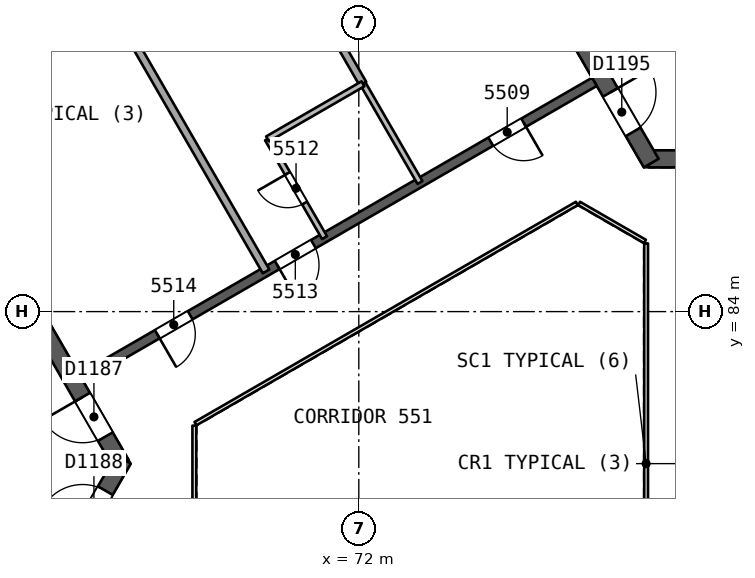
"""IFC4 building model, lengths in metres.
Left out: names, types, materials, properties, quantities, classifications, styles, units other than length and angle.
Written with IfcOpenShell. Run it as: python <this file> out.ifc"""

import sys

from ifc_helpers import new_model, si_unit, direction, frame, frame_2d, origin, place, context, subcontext, project, spatial, rectangle, extrude, element, fill, save


model = new_model("IFC4")
c1 = context("Model", 3, precision=1e-05, world=origin(), true_north=direction((0.0, 1.0)))
c2 = subcontext(c1, "Body", "Model", "MODEL_VIEW")
j1 = project(units=[si_unit("LENGTHUNIT", "METRE"), si_unit("PLANEANGLEUNIT", "RADIAN")], contexts=[c1])
p1 = place(None, origin())
s1 = spatial("IfcSite", under=j1, at=p1, CompositionType="ELEMENT")
p2 = place(p1, origin())
s2 = spatial("IfcBuilding", under=s1, at=p2, CompositionType="ELEMENT")
p3 = place(p2, frame((0.0, 0.0, 224.3)))
s3 = spatial("IfcBuildingStorey", under=s2, at=p3, CompositionType="ELEMENT", Elevation=224.3)
p4 = place(p3, frame((65.74, 80.0, 0.0), z_axis=(0.0, 0.0, 1.0), x_axis=(-0.499991857942, 0.866030104553, 0.0)))
e1 = element("IfcWall", 1, at=p4, inside=s3, PredefinedType="SHEAR", context=c2, shape_type="SweptSolid", body=[
    extrude(rectangle(XDim=10.25, YDim=0.45, at=frame_2d((5.125, 0.0))), origin(), (0.0, 0.0, 1.0), 3.7),
])
p5 = place(p4, frame((0.82, 0.0, 0.0)))
e2 = element("IfcOpeningElement", 2, at=p5, cuts=e1, PredefinedType="OPENING", context=c2, shape_type="SweptSolid", body=[
    extrude(rectangle(XDim=1.2, YDim=2.1, at=frame_2d((0.6, 1.05))), frame((0.0, 0.235, 0.0), z_axis=(0.0, -1.0, 0.0), x_axis=(1.0, 0.0, 0.0)), (0.0, 0.0, 1.0), 0.471),
])
p6 = place(p3, frame((60.728, 71.318, 0.0), z_axis=(0.0, 0.0, 1.0), x_axis=(0.500012416173, 0.866018235185, 0.0)))
e3 = element("IfcWall", 3, at=p6, inside=s3, PredefinedType="SHEAR", context=c2, shape_type="SweptSolid", body=[
    extrude(rectangle(XDim=10.155, YDim=0.45, at=frame_2d((5.078, 0.0))), origin(), (0.0, 0.0, 1.0), 3.7),
])
p7 = place(p6, frame((8.005, 0.0, 0.0)))
e4 = element("IfcOpeningElement", 4, at=p7, cuts=e3, PredefinedType="OPENING", context=c2, shape_type="SweptSolid", body=[
    extrude(rectangle(XDim=1.2, YDim=2.1, at=frame_2d((0.6, 1.05))), frame((0.0, 0.235, 0.0), z_axis=(0.0, -1.0, 0.0), x_axis=(1.0, 0.0, 0.0)), (0.0, 0.0, 1.0), 0.471),
])
p8 = place(p3, frame((79.63, 88.019, 0.0), z_axis=(0.0, 0.0, 1.0), x_axis=(1.0, 0.0, 0.0)))
e5 = element("IfcWall", 5, at=p8, inside=s3, PredefinedType="SHEAR", context=c2, shape_type="SweptSolid", body=[
    extrude(rectangle(XDim=10.25, YDim=0.45, at=frame_2d((5.125, 0.0))), origin(), (0.0, 0.0, 1.0), 3.7),
])
p9 = place(p8, frame((0.82, 0.0, 0.0)))
e6 = element("IfcOpeningElement", 6, at=p9, cuts=e5, PredefinedType="OPENING", context=c2, shape_type="SweptSolid", body=[
    extrude(rectangle(XDim=1.2, YDim=2.1, at=frame_2d((0.6, 1.05))), frame((0.0, 0.235, 0.0), z_axis=(0.0, -1.0, 0.0), x_axis=(1.0, 0.0, 0.0)), (0.0, 0.0, 1.0), 0.471),
])
p10 = place(p3, frame((74.617, 96.701, 0.0), z_axis=(0.0, 0.0, 1.0), x_axis=(0.499994385119, -0.866028645513, 0.0)))
e7 = element("IfcWall", 7, at=p10, inside=s3, PredefinedType="SHEAR", context=c2, shape_type="SweptSolid", body=[
    extrude(rectangle(XDim=10.155, YDim=0.45, at=frame_2d((5.077, 0.0))), origin(), (0.0, 0.0, 1.0), 3.7),
])
p11 = place(p10, frame((8.005, 0.0, 0.0)))
e8 = element("IfcOpeningElement", 8, at=p11, cuts=e7, PredefinedType="OPENING", context=c2, shape_type="SweptSolid", body=[
    extrude(rectangle(XDim=1.2, YDim=2.1, at=frame_2d((0.6, 1.05))), frame((0.0, 0.235, 0.0), z_axis=(0.0, -1.0, 0.0), x_axis=(1.0, 0.0, 0.0)), (0.0, 0.0, 1.0), 0.471),
])
p12 = place(p3, frame((78.2, 90.046, 0.0), z_axis=(0.0, 0.0, 1.0), x_axis=(-0.866026492143, -0.499998114903, 0.0)))
e9 = element("IfcWall", 9, at=p12, inside=s3, PredefinedType="SHEAR", context=c2, shape_type="SweptSolid", body=[
    extrude(rectangle(XDim=15.588, YDim=0.25, at=frame_2d((7.794, 0.0))), origin(), (0.0, 0.0, 1.0), 3.3),
])
p13 = place(p12, frame((2.15, 0.0, 0.0)))
e10 = element("IfcOpeningElement", 10, at=p13, cuts=e9, PredefinedType="OPENING", context=c2, shape_type="SweptSolid", body=[
    extrude(rectangle(XDim=1.0, YDim=2.1, at=frame_2d((0.5, 1.05))), frame((0.0, 0.135, 0.0), z_axis=(0.0, -1.0, 0.0), x_axis=(1.0, 0.0, 0.0)), (0.0, 0.0, 1.0), 0.271),
])
p14 = place(p12, frame((8.538, 0.0, 0.0)))
e11 = element("IfcOpeningElement", 11, at=p14, cuts=e9, PredefinedType="OPENING", context=c2, shape_type="SweptSolid", body=[
    extrude(rectangle(XDim=1.1, YDim=2.1, at=frame_2d((0.55, 1.05))), frame((0.0, 0.135, 0.0), z_axis=(0.0, -1.0, 0.0), x_axis=(1.0, 0.0, 0.0)), (0.0, 0.0, 1.0), 0.271),
])
p15 = place(p12, frame((12.282, 0.0, 0.0)))
e12 = element("IfcOpeningElement", 12, at=p15, cuts=e9, PredefinedType="OPENING", context=c2, shape_type="SweptSolid", body=[
    extrude(rectangle(XDim=1.0, YDim=2.1, at=frame_2d((0.5, 1.05))), frame((0.0, 0.135, 0.0), z_axis=(0.0, -1.0, 0.0), x_axis=(1.0, 0.0, 0.0)), (0.0, 0.0, 1.0), 0.271),
])
p16 = place(p3, frame((68.446, 96.34, 0.0), z_axis=(0.0, 0.0, 1.0), x_axis=(0.500019482754, -0.866014155119, 0.0)))
e13 = element("IfcWall", 13, at=p16, inside=s3, PredefinedType="PARTITIONING", context=c2, shape_type="SweptSolid", body=[
    extrude(rectangle(XDim=7.328, YDim=0.2, at=frame_2d((3.664, 0.0))), origin(), (0.0, 0.0, 1.0), 3.3),
])
p17 = place(p3, frame((72.11, 89.994, 0.0), z_axis=(0.0, 0.0, 1.0), x_axis=(0.499990139034, -0.866031096941, 0.0)))
e14 = element("IfcWall", 14, at=p17, inside=s3, PredefinedType="PARTITIONING", context=c2, shape_type="SweptSolid", body=[
    extrude(rectangle(XDim=3.0, YDim=0.15, at=frame_2d((1.5, 0.0))), origin(), (0.0, 0.0, 1.0), 3.3),
])
p18 = place(p3, frame((71.099, 85.946, 0.0), z_axis=(0.0, 0.0, 1.0), x_axis=(-0.499990139034, 0.866031096941, 0.0)))
e15 = element("IfcWall", 15, at=p18, inside=s3, PredefinedType="PARTITIONING", context=c2, shape_type="SweptSolid", body=[
    extrude(rectangle(XDim=3.0, YDim=0.15, at=frame_2d((1.5, 0.0))), origin(), (0.0, 0.0, 1.0), 3.3),
])
p19 = place(p18, frame((1.05, 0.0, 0.0)))
e16 = element("IfcOpeningElement", 16, at=p19, cuts=e15, PredefinedType="OPENING", context=c2, shape_type="SweptSolid", body=[
    extrude(rectangle(XDim=0.9, YDim=2.1, at=frame_2d((0.45, 1.05))), frame((0.0, 0.085, 0.0), z_axis=(0.0, -1.0, 0.0), x_axis=(1.0, 0.0, 0.0)), (0.0, 0.0, 1.0), 0.171),
])
p20 = place(p3, frame((69.599, 88.544, 0.0), z_axis=(0.0, 0.0, 1.0), x_axis=(0.866032775405, 0.499987231761, 0.0)))
e17 = element("IfcWall", 17, at=p20, inside=s3, PredefinedType="PARTITIONING", context=c2, shape_type="SweptSolid", body=[
    extrude(rectangle(XDim=2.9, YDim=0.15, at=frame_2d((1.45, 0.0))), origin(), (0.0, 0.0, 1.0), 3.3),
])
p21 = place(p3, frame((64.396, 94.002, 0.0), z_axis=(0.0, 0.0, 1.0), x_axis=(0.50001095942, -0.866019076268, 0.0)))
e18 = element("IfcWall", 18, at=p21, inside=s3, PredefinedType="PARTITIONING", context=c2, shape_type="SweptSolid", body=[
    extrude(rectangle(XDim=10.328, YDim=0.2, at=frame_2d((5.164, 0.0))), origin(), (0.0, 0.0, 1.0), 3.3),
])
p22 = place(p3, frame((44.324, 82.585, 0.0), z_axis=(0.0, 0.0, 1.0), x_axis=(0.86602584856, 0.499999229625, 0.0)))
e19 = element("IfcWall", 19, at=p22, inside=s3, PredefinedType="SOLIDWALL", context=c2, shape_type="SweptSolid", body=[
    extrude(rectangle(XDim=50.547, YDim=0.3, at=frame_2d((25.274, 0.0))), origin(), (0.0, 0.0, 1.0), 3.3),
])
p23 = place(p22, frame((24.23, 0.0, 0.0)))
e20 = element("IfcOpeningElement", 20, at=p23, cuts=e19, PredefinedType="OPENING", context=c2, shape_type="SweptSolid", body=[
    extrude(rectangle(XDim=2.4, YDim=2.4, at=frame_2d((1.2, 1.2))), frame((0.0, 0.161, 0.0), z_axis=(0.0, -1.0, 0.0), x_axis=(1.0, 0.0, 0.0)), (0.0, 0.0, 1.0), 0.321),
])
p24 = place(p22, frame((29.218, 0.0, 0.0)))
e21 = element("IfcOpeningElement", 21, at=p24, cuts=e19, PredefinedType="OPENING", context=c2, shape_type="SweptSolid", body=[
    extrude(rectangle(XDim=2.4, YDim=2.4, at=frame_2d((1.2, 1.2))), frame((0.0, 0.161, 0.0), z_axis=(0.0, -1.0, 0.0), x_axis=(1.0, 0.0, 0.0)), (0.0, 0.0, 1.0), 0.321),
])
p25 = place(p22, frame((39.328, 0.0, 0.0)))
e22 = element("IfcOpeningElement", 22, at=p25, cuts=e19, PredefinedType="OPENING", context=c2, shape_type="SweptSolid", body=[
    extrude(rectangle(XDim=2.4, YDim=2.4, at=frame_2d((1.2, 1.2))), frame((0.0, 0.161, 0.0), z_axis=(0.0, -1.0, 0.0), x_axis=(1.0, 0.0, 0.0)), (0.0, 0.0, 1.0), 0.321),
])
p26 = place(p22, frame((19.085, 0.0, 0.0)))
e23 = element("IfcOpeningElement", 23, at=p26, cuts=e19, PredefinedType="OPENING", context=c2, shape_type="SweptSolid", body=[
    extrude(rectangle(XDim=2.4, YDim=2.4, at=frame_2d((1.2, 1.2))), frame((0.0, 0.161, 0.0), z_axis=(0.0, -1.0, 0.0), x_axis=(1.0, 0.0, 0.0)), (0.0, 0.0, 1.0), 0.321),
])
p27 = place(p22, frame((8.771, 0.0, 0.0)))
e24 = element("IfcOpeningElement", 24, at=p27, cuts=e19, PredefinedType="OPENING", context=c2, shape_type="SweptSolid", body=[
    extrude(rectangle(XDim=2.4, YDim=2.4, at=frame_2d((1.2, 1.2))), frame((0.0, 0.161, 0.0), z_axis=(0.0, -1.0, 0.0), x_axis=(1.0, 0.0, 0.0)), (0.0, 0.0, 1.0), 0.321),
])
p28 = place(p3, frame((86.77, 89.486, 0.0), z_axis=(0.0, 0.0, 1.0), x_axis=(-0.86601811187, 0.500012629753, 0.0)))
e25 = element("IfcWall", 25, at=p28, inside=s3, PredefinedType="SOLIDWALL", context=c2, shape_type="SweptSolid", body=[
    extrude(rectangle(XDim=10.9, YDim=0.2, at=frame_2d((5.45, 0.0))), origin(), (0.0, 0.0, 1.0), 3.3),
])
p29 = place(p28, frame((0.625, 0.0, 0.0)))
e26 = element("IfcOpeningElement", 26, at=p29, cuts=e25, PredefinedType="OPENING", context=c2, shape_type="SweptSolid", body=[
    extrude(rectangle(XDim=1.0, YDim=2.1, at=frame_2d((0.5, 1.05))), frame((0.0, 0.11, 0.0), z_axis=(0.0, -1.0, 0.0), x_axis=(1.0, 0.0, 0.0)), (0.0, 0.0, 1.0), 0.221),
])
p30 = place(p28, frame((2.875, 0.0, 0.0)))
e27 = element("IfcOpeningElement", 27, at=p30, cuts=e25, PredefinedType="OPENING", context=c2, shape_type="SweptSolid", body=[
    extrude(rectangle(XDim=1.0, YDim=2.1, at=frame_2d((0.5, 1.05))), frame((0.0, 0.11, 0.0), z_axis=(0.0, -1.0, 0.0), x_axis=(1.0, 0.0, 0.0)), (0.0, 0.0, 1.0), 0.221),
])
p31 = place(p28, frame((6.25, 0.0, 0.0)))
e28 = element("IfcOpeningElement", 28, at=p31, cuts=e25, PredefinedType="OPENING", context=c2, shape_type="SweptSolid", body=[
    extrude(rectangle(XDim=1.0, YDim=2.1, at=frame_2d((0.5, 1.05))), frame((0.0, 0.11, 0.0), z_axis=(0.0, -1.0, 0.0), x_axis=(1.0, 0.0, 0.0)), (0.0, 0.0, 1.0), 0.221),
])
p32 = place(p3, frame((89.43, 90.814, 0.0), z_axis=(0.0, 0.0, 1.0), x_axis=(-0.866018983788, 0.500011119594, 0.0)))
e29 = element("IfcWall", 29, at=p32, inside=s3, PredefinedType="SOLIDWALL", context=c2, shape_type="SweptSolid", body=[
    extrude(rectangle(XDim=10.64, YDim=0.2, at=frame_2d((5.32, 0.0))), origin(), (0.0, 0.0, 1.0), 3.3),
])
p33 = place(p32, frame((0.37, 0.0, 0.0)))
e30 = element("IfcOpeningElement", 30, at=p33, cuts=e29, PredefinedType="OPENING", context=c2, shape_type="SweptSolid", body=[
    extrude(rectangle(XDim=0.9, YDim=2.1, at=frame_2d((0.45, 1.05))), frame((0.0, 0.11, 0.0), z_axis=(0.0, -1.0, 0.0), x_axis=(1.0, 0.0, 0.0)), (0.0, 0.0, 1.0), 0.221),
])
p34 = place(p3, frame((79.56, 74.206, 0.0), z_axis=(0.0, 0.0, 1.0), x_axis=(0.0, 1.0, 0.0)))
e31 = element("IfcWall", 31, at=p34, inside=s3, PredefinedType="PARTITIONING", context=c2, shape_type="SweptSolid", body=[
    extrude(rectangle(XDim=11.588, YDim=0.1, at=frame_2d((5.794, 0.0))), origin(), (0.0, 0.0, 1.0), 3.3),
])
p35 = place(p3, frame((79.53, 85.846, 0.0), z_axis=(0.0, 0.0, 1.0), x_axis=(-0.866041268327, 0.499972520799, 0.0)))
e32 = element("IfcWall", 32, at=p35, inside=s3, PredefinedType="PARTITIONING", context=c2, shape_type="SweptSolid", body=[
    extrude(rectangle(XDim=2.0, YDim=0.1, at=frame_2d((1.0, 0.0))), origin(), (0.0, 0.0, 1.0), 3.3),
])
p36 = place(p3, frame((77.738, 86.846, 0.0), z_axis=(0.0, 0.0, 1.0), x_axis=(-0.866026658274, -0.499997827154, 0.0)))
e33 = element("IfcWall", 33, at=p36, inside=s3, PredefinedType="PARTITIONING", context=c2, shape_type="SweptSolid", body=[
    extrude(rectangle(XDim=11.588, YDim=0.1, at=frame_2d((5.794, 0.0))), origin(), (0.0, 0.0, 1.0), 3.3),
])
p37 = place(p3, frame((67.672, 81.0, 0.0), z_axis=(0.0, 0.0, 1.0), x_axis=(0.0, -1.0, 0.0)))
e34 = element("IfcWall", 34, at=p37, inside=s3, PredefinedType="PARTITIONING", context=c2, shape_type="SweptSolid", body=[
    extrude(rectangle(XDim=2.0, YDim=0.1, at=frame_2d((1.0, 0.0))), origin(), (0.0, 0.0, 1.0), 3.3),
])
p38 = place(p13, origin())
e35 = element("IfcDoor", 35, at=p38, inside=s3, OperationType="SINGLE_SWING_LEFT", PredefinedType="NOTDEFINED", context=c2, shape_type="SweptSolid", body=[
    extrude(rectangle(XDim=1.0, YDim=2.1, at=frame_2d((0.5, 1.05))), frame((0.0, 0.025, 0.0), z_axis=(0.0, -1.0, 0.0), x_axis=(1.0, 0.0, 0.0)), (0.0, 0.0, 1.0), 0.05),
])
fill(e10, e35)
p39 = place(p19, origin())
e36 = element("IfcDoor", 36, at=p39, inside=s3, OperationType="SINGLE_SWING_RIGHT", PredefinedType="NOTDEFINED", context=c2, shape_type="SweptSolid", body=[
    extrude(rectangle(XDim=0.9, YDim=2.1, at=frame_2d((0.45, 1.05))), frame((0.0, 0.025, 0.0), z_axis=(0.0, -1.0, 0.0), x_axis=(1.0, 0.0, 0.0)), (0.0, 0.0, 1.0), 0.05),
])
fill(e16, e36)
p40 = place(p14, origin())
e37 = element("IfcDoor", 37, at=p40, inside=s3, OperationType="SINGLE_SWING_RIGHT", PredefinedType="NOTDEFINED", context=c2, shape_type="SweptSolid", body=[
    extrude(rectangle(XDim=1.1, YDim=2.1, at=frame_2d((0.55, 1.05))), frame((0.0, 0.025, 0.0), z_axis=(0.0, -1.0, 0.0), x_axis=(1.0, 0.0, 0.0)), (0.0, 0.0, 1.0), 0.05),
])
fill(e11, e37)
p41 = place(p15, origin())
e38 = element("IfcDoor", 38, at=p41, inside=s3, OperationType="SINGLE_SWING_RIGHT", PredefinedType="NOTDEFINED", context=c2, shape_type="SweptSolid", body=[
    extrude(rectangle(XDim=1.0, YDim=2.1, at=frame_2d((0.5, 1.05))), frame((0.0, 0.025, 0.0), z_axis=(0.0, -1.0, 0.0), x_axis=(1.0, 0.0, 0.0)), (0.0, 0.0, 1.0), 0.05),
])
fill(e12, e38)
p42 = place(p5, origin())
e39 = element("IfcDoor", 39, at=p42, inside=s3, OperationType="SINGLE_SWING_RIGHT", PredefinedType="NOTDEFINED", context=c2, shape_type="SweptSolid", body=[
    extrude(rectangle(XDim=1.2, YDim=2.1, at=frame_2d((0.6, 1.05))), frame((0.0, 0.025, 0.0), z_axis=(0.0, -1.0, 0.0), x_axis=(1.0, 0.0, 0.0)), (0.0, 0.0, 1.0), 0.05),
])
fill(e2, e39)
p43 = place(p7, origin())
e40 = element("IfcDoor", 40, at=p43, inside=s3, OperationType="SINGLE_SWING_LEFT", PredefinedType="NOTDEFINED", context=c2, shape_type="SweptSolid", body=[
    extrude(rectangle(XDim=1.2, YDim=2.1, at=frame_2d((0.6, 1.05))), frame((0.0, 0.025, 0.0), z_axis=(0.0, -1.0, 0.0), x_axis=(1.0, 0.0, 0.0)), (0.0, 0.0, 1.0), 0.05),
])
fill(e4, e40)
p44 = place(p11, origin())
e41 = element("IfcDoor", 41, at=p44, inside=s3, OperationType="SINGLE_SWING_LEFT", PredefinedType="NOTDEFINED", context=c2, shape_type="SweptSolid", body=[
    extrude(rectangle(XDim=1.2, YDim=2.1, at=frame_2d((0.6, 1.05))), frame((0.0, 0.025, 0.0), z_axis=(0.0, -1.0, 0.0), x_axis=(1.0, 0.0, 0.0)), (0.0, 0.0, 1.0), 0.05),
])
fill(e8, e41)
save(model, sys.argv[1])
